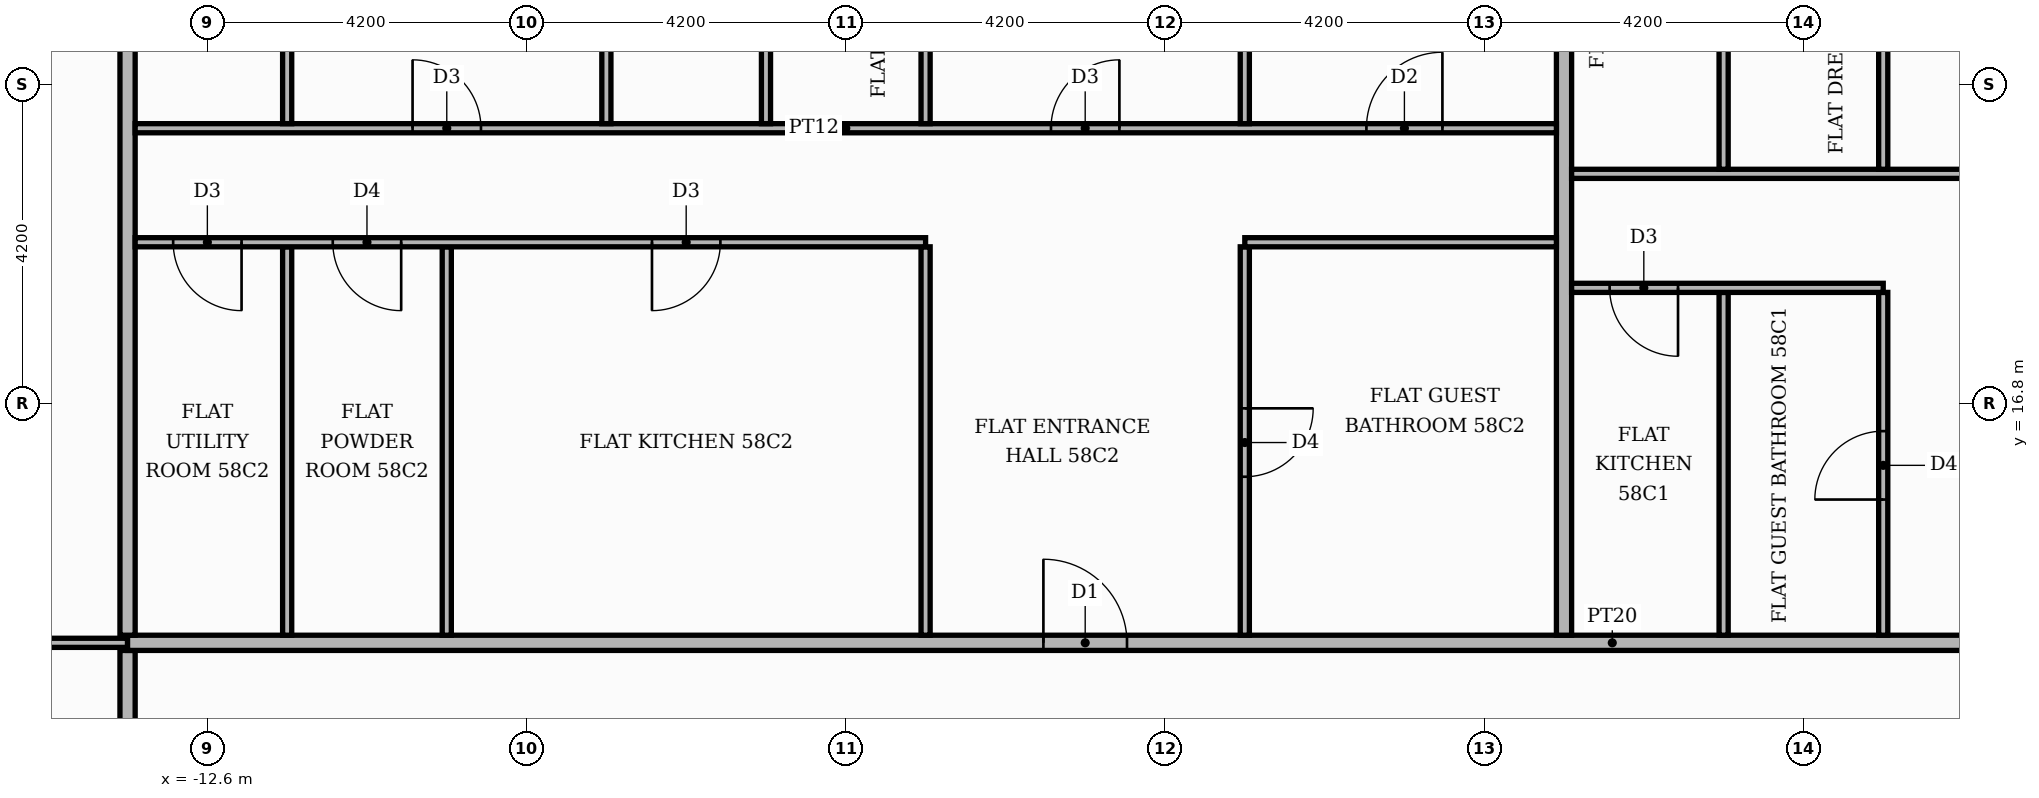
"""IFC4 building model, lengths in metres.
Left out: names, types, materials, properties, quantities, classifications, styles, units other than length and angle.
Written with IfcOpenShell. Run it as: python <this file> out.ifc"""

import sys

from ifc_helpers import new_model, si_unit, direction, frame, frame_2d, origin, place, context, subcontext, project, spatial, rectangle, extrude, element, fill, save


model = new_model("IFC4")
c1 = context("Model", 3, precision=1e-05, world=origin(), true_north=direction((0.0, 1.0)))
c2 = subcontext(c1, "Body", "Model", "MODEL_VIEW")
j1 = project(units=[si_unit("LENGTHUNIT", "METRE"), si_unit("PLANEANGLEUNIT", "RADIAN")], contexts=[c1])
p1 = place(None, origin())
s1 = spatial("IfcSite", under=j1, at=p1, CompositionType="ELEMENT")
p2 = place(p1, origin())
s2 = spatial("IfcBuilding", under=s1, at=p2, CompositionType="ELEMENT")
p3 = place(p2, frame((0.0, 0.0, 244.5)))
s3 = spatial("IfcBuildingStorey", under=s2, at=p3, CompositionType="ELEMENT", Elevation=244.5)
p4 = place(p3, frame((-13.65, 11.1, 0.0), z_axis=(0.0, 0.0, 1.0), x_axis=(0.0, 1.0, 0.0)))
e1 = element("IfcWall", 1, at=p4, inside=s3, PredefinedType="PARTITIONING", context=c2, shape_type="SweptSolid", body=[
    extrude(rectangle(XDim=2.45, YDim=0.2, at=frame_2d((1.225, 0.0))), origin(), (0.0, 0.0, 1.0), 3.48),
])
p5 = place(p3, frame((-19.82, 13.65, 0.0), z_axis=(0.0, 0.0, 1.0), x_axis=(1.0, 0.0, 0.0)))
e2 = element("IfcWall", 2, at=p5, inside=s3, PredefinedType="PARTITIONING", context=c2, shape_type="SweptSolid", body=[
    extrude(rectangle(XDim=6.17, YDim=0.12, at=frame_2d((3.085, 0.0))), origin(), (0.0, 0.0, 1.0), 3.48),
])
p6 = place(p5, frame((2.635, 0.0, 0.0)))
e3 = element("IfcOpeningElement", 3, at=p6, cuts=e2, PredefinedType="OPENING", context=c2, shape_type="SweptSolid", body=[
    extrude(rectangle(XDim=0.9, YDim=2.1, at=frame_2d((0.45, 1.05))), frame((0.0, 0.07, 0.0), z_axis=(0.0, -1.0, 0.0), x_axis=(1.0, 0.0, 0.0)), (0.0, 0.0, 1.0), 0.14),
])
p7 = place(p3, frame((-13.65, 13.65, 0.0), z_axis=(0.0, 0.0, 1.0), x_axis=(1.0, 0.0, 0.0)))
e4 = element("IfcWall", 4, at=p7, inside=s3, PredefinedType="PARTITIONING", context=c2, shape_type="SweptSolid", body=[
    extrude(rectangle(XDim=39.07, YDim=0.2, at=frame_2d((19.535, 0.0))), origin(), (0.0, 0.0, 1.0), 3.48),
])
p8 = place(p7, frame((24.65, 0.0, 0.0)))
e5 = element("IfcOpeningElement", 5, at=p8, cuts=e4, PredefinedType="OPENING", context=c2, shape_type="SweptSolid", body=[
    extrude(rectangle(XDim=1.1, YDim=2.4, at=frame_2d((0.55, 1.2))), frame((0.0, 0.11, 0.0), z_axis=(0.0, -1.0, 0.0), x_axis=(1.0, 0.0, 0.0)), (0.0, 0.0, 1.0), 0.22),
])
p9 = place(p7, frame((12.05, 0.0, 0.0)))
e6 = element("IfcOpeningElement", 6, at=p9, cuts=e4, PredefinedType="OPENING", context=c2, shape_type="SweptSolid", body=[
    extrude(rectangle(XDim=1.1, YDim=2.4, at=frame_2d((0.55, 1.2))), frame((0.0, 0.11, 0.0), z_axis=(0.0, -1.0, 0.0), x_axis=(1.0, 0.0, 0.0)), (0.0, 0.0, 1.0), 0.22),
])
p10 = place(p3, frame((-13.65, 13.75, 0.0), z_axis=(0.0, 0.0, 1.0), x_axis=(0.0, 1.0, 0.0)))
e7 = element("IfcWall", 7, at=p10, inside=s3, PredefinedType="PARTITIONING", context=c2, shape_type="SweptSolid", body=[
    extrude(rectangle(XDim=11.67, YDim=0.2, at=frame_2d((5.835, 0.0))), origin(), (0.0, 0.0, 1.0), 3.48),
])
for number, where, z_axis, x_axis in (
    (8, (-11.55, 13.75, 0.0), (0.0, 0.0, 1.0), (0.0, 1.0, 0.0)),
    (9, (-9.45, 13.75, 0.0), (0.0, 0.0, 1.0), (0.0, 1.0, 0.0)),
    (10, (-3.15, 13.75, 0.0), (0.0, 0.0, 1.0), (0.0, 1.0, 0.0)),
):
    element("IfcWall", number, at=place(p3, frame(where, z_axis=z_axis, x_axis=x_axis)), inside=s3, PredefinedType="PARTITIONING", context=c2, shape_type="SweptSolid", body=[
        extrude(rectangle(XDim=5.11, YDim=0.12, at=frame_2d((2.555, 0.0))), origin(), (0.0, 0.0, 1.0), 3.48),
    ])
p11 = place(p3, frame((1.05, 13.75, 0.0), z_axis=(0.0, 0.0, 1.0), x_axis=(0.0, 1.0, 0.0)))
e11 = element("IfcWall", 11, at=p11, inside=s3, PredefinedType="PARTITIONING", context=c2, shape_type="SweptSolid", body=[
    extrude(rectangle(XDim=5.11, YDim=0.12, at=frame_2d((2.555, 0.0))), origin(), (0.0, 0.0, 1.0), 3.48),
])
p12 = place(p11, frame((2.085, 0.0, 0.0)))
e12 = element("IfcOpeningElement", 12, at=p12, cuts=e11, PredefinedType="OPENING", context=c2, shape_type="SweptSolid", body=[
    extrude(rectangle(XDim=0.9, YDim=2.1, at=frame_2d((0.45, 1.05))), frame((0.0, 0.07, 0.0), z_axis=(0.0, -1.0, 0.0), x_axis=(1.0, 0.0, 0.0)), (0.0, 0.0, 1.0), 0.14),
])
p13 = place(p3, frame((5.25, 13.75, 0.0), z_axis=(0.0, 0.0, 1.0), x_axis=(0.0, 1.0, 0.0)))
e13 = element("IfcWall", 13, at=p13, inside=s3, PredefinedType="PARTITIONING", context=c2, shape_type="SweptSolid", body=[
    extrude(rectangle(XDim=11.67, YDim=0.2, at=frame_2d((5.835, 0.0))), origin(), (0.0, 0.0, 1.0), 3.48),
])
p14 = place(p3, frame((7.35, 13.75, 0.0), z_axis=(0.0, 0.0, 1.0), x_axis=(0.0, 1.0, 0.0)))
e14 = element("IfcWall", 14, at=p14, inside=s3, PredefinedType="PARTITIONING", context=c2, shape_type="SweptSolid", body=[
    extrude(rectangle(XDim=4.51, YDim=0.12, at=frame_2d((2.255, 0.0))), origin(), (0.0, 0.0, 1.0), 3.48),
])
p15 = place(p3, frame((9.45, 13.75, 0.0), z_axis=(0.0, 0.0, 1.0), x_axis=(0.0, 1.0, 0.0)))
e15 = element("IfcWall", 15, at=p15, inside=s3, PredefinedType="PARTITIONING", context=c2, shape_type="SweptSolid", body=[
    extrude(rectangle(XDim=4.51, YDim=0.12, at=frame_2d((2.255, 0.0))), origin(), (0.0, 0.0, 1.0), 3.48),
])
p16 = place(p15, frame((1.785, 0.0, 0.0)))
e16 = element("IfcOpeningElement", 16, at=p16, cuts=e15, PredefinedType="OPENING", context=c2, shape_type="SweptSolid", body=[
    extrude(rectangle(XDim=0.9, YDim=2.1, at=frame_2d((0.45, 1.05))), frame((0.0, 0.07, 0.0), z_axis=(0.0, -1.0, 0.0), x_axis=(1.0, 0.0, 0.0)), (0.0, 0.0, 1.0), 0.14),
])
p17 = place(p3, frame((5.35, 18.32, 0.0), z_axis=(0.0, 0.0, 1.0), x_axis=(1.0, 0.0, 0.0)))
e17 = element("IfcWall", 17, at=p17, inside=s3, PredefinedType="PARTITIONING", context=c2, shape_type="SweptSolid", body=[
    extrude(rectangle(XDim=4.1, YDim=0.12, at=frame_2d((2.05, 0.0))), origin(), (0.0, 0.0, 1.0), 3.48),
])
p18 = place(p17, frame((0.5, 0.0, 0.0)))
e18 = element("IfcOpeningElement", 18, at=p18, cuts=e17, PredefinedType="OPENING", context=c2, shape_type="SweptSolid", body=[
    extrude(rectangle(XDim=0.9, YDim=2.1, at=frame_2d((0.45, 1.05))), frame((0.0, 0.07, 0.0), z_axis=(0.0, -1.0, 0.0), x_axis=(1.0, 0.0, 0.0)), (0.0, 0.0, 1.0), 0.14),
])
p19 = place(p3, frame((-13.55, 18.92, 0.0), z_axis=(0.0, 0.0, 1.0), x_axis=(1.0, 0.0, 0.0)))
e19 = element("IfcWall", 19, at=p19, inside=s3, PredefinedType="PARTITIONING", context=c2, shape_type="SweptSolid", body=[
    extrude(rectangle(XDim=10.4, YDim=0.12, at=frame_2d((5.2, 0.0))), origin(), (0.0, 0.0, 1.0), 3.48),
])
p20 = place(p19, frame((6.8, 0.0, 0.0)))
e20 = element("IfcOpeningElement", 20, at=p20, cuts=e19, PredefinedType="OPENING", context=c2, shape_type="SweptSolid", body=[
    extrude(rectangle(XDim=0.9, YDim=2.1, at=frame_2d((0.45, 1.05))), frame((0.0, 0.07, 0.0), z_axis=(0.0, -1.0, 0.0), x_axis=(1.0, 0.0, 0.0)), (0.0, 0.0, 1.0), 0.14),
])
p21 = place(p19, frame((2.6, 0.0, 0.0)))
e21 = element("IfcOpeningElement", 21, at=p21, cuts=e19, PredefinedType="OPENING", context=c2, shape_type="SweptSolid", body=[
    extrude(rectangle(XDim=0.9, YDim=2.1, at=frame_2d((0.45, 1.05))), frame((0.0, 0.07, 0.0), z_axis=(0.0, -1.0, 0.0), x_axis=(1.0, 0.0, 0.0)), (0.0, 0.0, 1.0), 0.14),
])
p22 = place(p19, frame((0.5, 0.0, 0.0)))
e22 = element("IfcOpeningElement", 22, at=p22, cuts=e19, PredefinedType="OPENING", context=c2, shape_type="SweptSolid", body=[
    extrude(rectangle(XDim=0.9, YDim=2.1, at=frame_2d((0.45, 1.05))), frame((0.0, 0.07, 0.0), z_axis=(0.0, -1.0, 0.0), x_axis=(1.0, 0.0, 0.0)), (0.0, 0.0, 1.0), 0.14),
])
p23 = place(p3, frame((1.05, 18.92, 0.0), z_axis=(0.0, 0.0, 1.0), x_axis=(1.0, 0.0, 0.0)))
e23 = element("IfcWall", 23, at=p23, inside=s3, PredefinedType="PARTITIONING", context=c2, shape_type="SweptSolid", body=[
    extrude(rectangle(XDim=4.1, YDim=0.12, at=frame_2d((2.05, 0.0))), origin(), (0.0, 0.0, 1.0), 3.48),
])
p24 = place(p3, frame((5.35, 19.82, 0.0), z_axis=(0.0, 0.0, 1.0), x_axis=(1.0, 0.0, 0.0)))
e24 = element("IfcWall", 24, at=p24, inside=s3, PredefinedType="PARTITIONING", context=c2, shape_type="SweptSolid", body=[
    extrude(rectangle(XDim=12.35, YDim=0.12, at=frame_2d((6.175, 0.0))), origin(), (0.0, 0.0, 1.0), 3.48),
])
p25 = place(p24, frame((8.85, 0.0, 0.0)))
e25 = element("IfcOpeningElement", 25, at=p25, cuts=e24, PredefinedType="OPENING", context=c2, shape_type="SweptSolid", body=[
    extrude(rectangle(XDim=1.0, YDim=2.1, at=frame_2d((0.5, 1.05))), frame((0.0, 0.07, 0.0), z_axis=(0.0, -1.0, 0.0), x_axis=(1.0, 0.0, 0.0)), (0.0, 0.0, 1.0), 0.14),
])
p26 = place(p24, frame((5.75, 0.0, 0.0)))
e26 = element("IfcOpeningElement", 26, at=p26, cuts=e24, PredefinedType="OPENING", context=c2, shape_type="SweptSolid", body=[
    extrude(rectangle(XDim=0.9, YDim=2.1, at=frame_2d((0.45, 1.05))), frame((0.0, 0.07, 0.0), z_axis=(0.0, -1.0, 0.0), x_axis=(1.0, 0.0, 0.0)), (0.0, 0.0, 1.0), 0.14),
])
p27 = place(p3, frame((7.35, 19.88, 0.0), z_axis=(0.0, 0.0, 1.0), x_axis=(0.0, 1.0, 0.0)))
e27 = element("IfcWall", 27, at=p27, inside=s3, PredefinedType="PARTITIONING", context=c2, shape_type="SweptSolid", body=[
    extrude(rectangle(XDim=5.54, YDim=0.12, at=frame_2d((2.77, 0.0))), origin(), (0.0, 0.0, 1.0), 3.48),
])
p28 = place(p27, frame((2.44, 0.0, 0.0)))
e28 = element("IfcOpeningElement", 28, at=p28, cuts=e27, PredefinedType="OPENING", context=c2, shape_type="SweptSolid", body=[
    extrude(rectangle(XDim=0.9, YDim=2.1, at=frame_2d((0.45, 1.05))), frame((0.0, 0.07, 0.0), z_axis=(0.0, -1.0, 0.0), x_axis=(1.0, 0.0, 0.0)), (0.0, 0.0, 1.0), 0.14),
])
p29 = place(p3, frame((9.45, 19.88, 0.0), z_axis=(0.0, 0.0, 1.0), x_axis=(0.0, 1.0, 0.0)))
e29 = element("IfcWall", 29, at=p29, inside=s3, PredefinedType="PARTITIONING", context=c2, shape_type="SweptSolid", body=[
    extrude(rectangle(XDim=5.54, YDim=0.12, at=frame_2d((2.77, 0.0))), origin(), (0.0, 0.0, 1.0), 3.48),
])
p30 = place(p29, frame((2.44, 0.0, 0.0)))
e30 = element("IfcOpeningElement", 30, at=p30, cuts=e29, PredefinedType="OPENING", context=c2, shape_type="SweptSolid", body=[
    extrude(rectangle(XDim=0.9, YDim=2.1, at=frame_2d((0.45, 1.05))), frame((0.0, 0.07, 0.0), z_axis=(0.0, -1.0, 0.0), x_axis=(1.0, 0.0, 0.0)), (0.0, 0.0, 1.0), 0.14),
])
p31 = place(p3, frame((-13.55, 20.42, 0.0), z_axis=(0.0, 0.0, 1.0), x_axis=(1.0, 0.0, 0.0)))
e31 = element("IfcWall", 31, at=p31, inside=s3, PredefinedType="PARTITIONING", context=c2, shape_type="SweptSolid", body=[
    extrude(rectangle(XDim=18.7, YDim=0.12, at=frame_2d((9.35, 0.0))), origin(), (0.0, 0.0, 1.0), 3.48),
])
p32 = place(p31, frame((16.2, 0.0, 0.0)))
e32 = element("IfcOpeningElement", 32, at=p32, cuts=e31, PredefinedType="OPENING", context=c2, shape_type="SweptSolid", body=[
    extrude(rectangle(XDim=1.0, YDim=2.1, at=frame_2d((0.5, 1.05))), frame((0.0, 0.07, 0.0), z_axis=(0.0, -1.0, 0.0), x_axis=(1.0, 0.0, 0.0)), (0.0, 0.0, 1.0), 0.14),
])
p33 = place(p31, frame((12.05, 0.0, 0.0)))
e33 = element("IfcOpeningElement", 33, at=p33, cuts=e31, PredefinedType="OPENING", context=c2, shape_type="SweptSolid", body=[
    extrude(rectangle(XDim=0.9, YDim=2.1, at=frame_2d((0.45, 1.05))), frame((0.0, 0.07, 0.0), z_axis=(0.0, -1.0, 0.0), x_axis=(1.0, 0.0, 0.0)), (0.0, 0.0, 1.0), 0.14),
])
p34 = place(p31, frame((3.65, 0.0, 0.0)))
e34 = element("IfcOpeningElement", 34, at=p34, cuts=e31, PredefinedType="OPENING", context=c2, shape_type="SweptSolid", body=[
    extrude(rectangle(XDim=0.9, YDim=2.1, at=frame_2d((0.45, 1.05))), frame((0.0, 0.07, 0.0), z_axis=(0.0, -1.0, 0.0), x_axis=(1.0, 0.0, 0.0)), (0.0, 0.0, 1.0), 0.14),
])
p35 = place(p3, frame((-11.55, 20.48, 0.0), z_axis=(0.0, 0.0, 1.0), x_axis=(0.0, 1.0, 0.0)))
e35 = element("IfcWall", 35, at=p35, inside=s3, PredefinedType="PARTITIONING", context=c2, shape_type="SweptSolid", body=[
    extrude(rectangle(XDim=4.94, YDim=0.12, at=frame_2d((2.47, 0.0))), origin(), (0.0, 0.0, 1.0), 3.48),
])
p36 = place(p35, frame((2.14, 0.0, 0.0)))
e36 = element("IfcOpeningElement", 36, at=p36, cuts=e35, PredefinedType="OPENING", context=c2, shape_type="SweptSolid", body=[
    extrude(rectangle(XDim=0.9, YDim=2.1, at=frame_2d((0.45, 1.05))), frame((0.0, 0.07, 0.0), z_axis=(0.0, -1.0, 0.0), x_axis=(1.0, 0.0, 0.0)), (0.0, 0.0, 1.0), 0.14),
])
p37 = place(p3, frame((-7.35, 20.48, 0.0), z_axis=(0.0, 0.0, 1.0), x_axis=(0.0, 1.0, 0.0)))
e37 = element("IfcWall", 37, at=p37, inside=s3, PredefinedType="PARTITIONING", context=c2, shape_type="SweptSolid", body=[
    extrude(rectangle(XDim=4.94, YDim=0.12, at=frame_2d((2.47, 0.0))), origin(), (0.0, 0.0, 1.0), 3.48),
])
p38 = place(p3, frame((-5.25, 20.48, 0.0), z_axis=(0.0, 0.0, 1.0), x_axis=(0.0, 1.0, 0.0)))
e38 = element("IfcWall", 38, at=p38, inside=s3, PredefinedType="PARTITIONING", context=c2, shape_type="SweptSolid", body=[
    extrude(rectangle(XDim=4.94, YDim=0.12, at=frame_2d((2.47, 0.0))), origin(), (0.0, 0.0, 1.0), 3.48),
])
p39 = place(p38, frame((2.14, 0.0, 0.0)))
e39 = element("IfcOpeningElement", 39, at=p39, cuts=e38, PredefinedType="OPENING", context=c2, shape_type="SweptSolid", body=[
    extrude(rectangle(XDim=0.9, YDim=2.1, at=frame_2d((0.45, 1.05))), frame((0.0, 0.07, 0.0), z_axis=(0.0, -1.0, 0.0), x_axis=(1.0, 0.0, 0.0)), (0.0, 0.0, 1.0), 0.14),
])
p40 = place(p3, frame((-3.15, 20.48, 0.0), z_axis=(0.0, 0.0, 1.0), x_axis=(0.0, 1.0, 0.0)))
e40 = element("IfcWall", 40, at=p40, inside=s3, PredefinedType="PARTITIONING", context=c2, shape_type="SweptSolid", body=[
    extrude(rectangle(XDim=4.94, YDim=0.12, at=frame_2d((2.47, 0.0))), origin(), (0.0, 0.0, 1.0), 3.48),
])
p41 = place(p40, frame((2.14, 0.0, 0.0)))
e41 = element("IfcOpeningElement", 41, at=p41, cuts=e40, PredefinedType="OPENING", context=c2, shape_type="SweptSolid", body=[
    extrude(rectangle(XDim=0.9, YDim=2.1, at=frame_2d((0.45, 1.05))), frame((0.0, 0.07, 0.0), z_axis=(0.0, -1.0, 0.0), x_axis=(1.0, 0.0, 0.0)), (0.0, 0.0, 1.0), 0.14),
])
p42 = place(p3, frame((1.05, 20.48, 0.0), z_axis=(0.0, 0.0, 1.0), x_axis=(0.0, 1.0, 0.0)))
e42 = element("IfcWall", 42, at=p42, inside=s3, PredefinedType="PARTITIONING", context=c2, shape_type="SweptSolid", body=[
    extrude(rectangle(XDim=4.94, YDim=0.12, at=frame_2d((2.47, 0.0))), origin(), (0.0, 0.0, 1.0), 3.48),
])
p43 = place(p16, origin())
e43 = element("IfcDoor", 43, at=p43, inside=s3, OperationType="SINGLE_SWING_LEFT", PredefinedType="DOOR", context=c2, shape_type="SweptSolid", body=[
    extrude(rectangle(XDim=0.9, YDim=2.1, at=frame_2d((0.45, 1.05))), frame((0.0, 0.025, 0.0), z_axis=(0.0, -1.0, 0.0), x_axis=(1.0, 0.0, 0.0)), (0.0, 0.0, 1.0), 0.05),
])
fill(e16, e43)
p44 = place(p18, frame((0.9, 0.0, 0.0), z_axis=(0.0, 0.0, 1.0), x_axis=(-1.0, 0.0, 0.0)))
e44 = element("IfcDoor", 44, at=p44, inside=s3, OperationType="SINGLE_SWING_RIGHT", PredefinedType="DOOR", context=c2, shape_type="SweptSolid", body=[
    extrude(rectangle(XDim=0.9, YDim=2.1, at=frame_2d((0.45, 1.05))), frame((0.0, 0.025, 0.0), z_axis=(0.0, -1.0, 0.0), x_axis=(1.0, 0.0, 0.0)), (0.0, 0.0, 1.0), 0.05),
])
fill(e18, e44)
p45 = place(p9, origin())
e45 = element("IfcDoor", 45, at=p45, inside=s3, OperationType="SINGLE_SWING_LEFT", PredefinedType="DOOR", context=c2, shape_type="SweptSolid", body=[
    extrude(rectangle(XDim=1.1, YDim=2.4, at=frame_2d((0.55, 1.2))), frame((0.0, 0.025, 0.0), z_axis=(0.0, -1.0, 0.0), x_axis=(1.0, 0.0, 0.0)), (0.0, 0.0, 1.0), 0.05),
])
fill(e6, e45)
p46 = place(p12, frame((0.9, 0.0, 0.0), z_axis=(0.0, 0.0, 1.0), x_axis=(-1.0, 0.0, 0.0)))
e46 = element("IfcDoor", 46, at=p46, inside=s3, OperationType="SINGLE_SWING_RIGHT", PredefinedType="DOOR", context=c2, shape_type="SweptSolid", body=[
    extrude(rectangle(XDim=0.9, YDim=2.1, at=frame_2d((0.45, 1.05))), frame((0.0, 0.025, 0.0), z_axis=(0.0, -1.0, 0.0), x_axis=(1.0, 0.0, 0.0)), (0.0, 0.0, 1.0), 0.05),
])
fill(e12, e46)
p47 = place(p20, frame((0.9, 0.0, 0.0), z_axis=(0.0, 0.0, 1.0), x_axis=(-1.0, 0.0, 0.0)))
e47 = element("IfcDoor", 47, at=p47, inside=s3, OperationType="SINGLE_SWING_LEFT", PredefinedType="DOOR", context=c2, shape_type="SweptSolid", body=[
    extrude(rectangle(XDim=0.9, YDim=2.1, at=frame_2d((0.45, 1.05))), frame((0.0, 0.025, 0.0), z_axis=(0.0, -1.0, 0.0), x_axis=(1.0, 0.0, 0.0)), (0.0, 0.0, 1.0), 0.05),
])
fill(e20, e47)
p48 = place(p21, frame((0.9, 0.0, 0.0), z_axis=(0.0, 0.0, 1.0), x_axis=(-1.0, 0.0, 0.0)))
e48 = element("IfcDoor", 48, at=p48, inside=s3, OperationType="SINGLE_SWING_RIGHT", PredefinedType="DOOR", context=c2, shape_type="SweptSolid", body=[
    extrude(rectangle(XDim=0.9, YDim=2.1, at=frame_2d((0.45, 1.05))), frame((0.0, 0.025, 0.0), z_axis=(0.0, -1.0, 0.0), x_axis=(1.0, 0.0, 0.0)), (0.0, 0.0, 1.0), 0.05),
])
fill(e21, e48)
p49 = place(p22, frame((0.9, 0.0, 0.0), z_axis=(0.0, 0.0, 1.0), x_axis=(-1.0, 0.0, 0.0)))
e49 = element("IfcDoor", 49, at=p49, inside=s3, OperationType="SINGLE_SWING_RIGHT", PredefinedType="DOOR", context=c2, shape_type="SweptSolid", body=[
    extrude(rectangle(XDim=0.9, YDim=2.1, at=frame_2d((0.45, 1.05))), frame((0.0, 0.025, 0.0), z_axis=(0.0, -1.0, 0.0), x_axis=(1.0, 0.0, 0.0)), (0.0, 0.0, 1.0), 0.05),
])
fill(e22, e49)
p50 = place(p32, origin())
e50 = element("IfcDoor", 50, at=p50, inside=s3, OperationType="SINGLE_SWING_RIGHT", PredefinedType="DOOR", context=c2, shape_type="SweptSolid", body=[
    extrude(rectangle(XDim=1.0, YDim=2.1, at=frame_2d((0.5, 1.05))), frame((0.0, 0.025, 0.0), z_axis=(0.0, -1.0, 0.0), x_axis=(1.0, 0.0, 0.0)), (0.0, 0.0, 1.0), 0.05),
])
fill(e32, e50)
p51 = place(p33, origin())
e51 = element("IfcDoor", 51, at=p51, inside=s3, OperationType="SINGLE_SWING_RIGHT", PredefinedType="DOOR", context=c2, shape_type="SweptSolid", body=[
    extrude(rectangle(XDim=0.9, YDim=2.1, at=frame_2d((0.45, 1.05))), frame((0.0, 0.025, 0.0), z_axis=(0.0, -1.0, 0.0), x_axis=(1.0, 0.0, 0.0)), (0.0, 0.0, 1.0), 0.05),
])
fill(e33, e51)
p52 = place(p34, origin())
e52 = element("IfcDoor", 52, at=p52, inside=s3, OperationType="SINGLE_SWING_LEFT", PredefinedType="DOOR", context=c2, shape_type="SweptSolid", body=[
    extrude(rectangle(XDim=0.9, YDim=2.1, at=frame_2d((0.45, 1.05))), frame((0.0, 0.025, 0.0), z_axis=(0.0, -1.0, 0.0), x_axis=(1.0, 0.0, 0.0)), (0.0, 0.0, 1.0), 0.05),
])
fill(e34, e52)
save(model, sys.argv[1])
